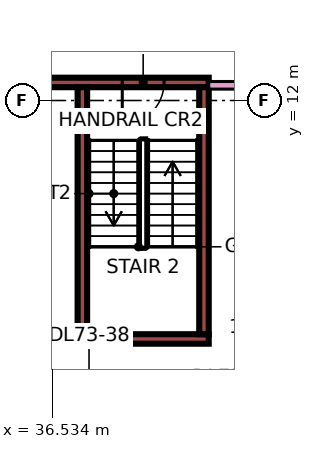
"""IFC4 building model, lengths in metres.
Left out: names, types, materials, properties, quantities, classifications, styles, units other than length and angle.
Written with IfcOpenShell. Run it as: python <this file> out.ifc"""

import sys

from ifc_helpers import new_model, si_unit, direction, frame, frame_2d, origin, place, context, subcontext, project, spatial, rectangle, extrude, element, fill, save


model = new_model("IFC4")
c1 = context("Model", 3, precision=1e-05, world=origin(), true_north=direction((0.0, 1.0)))
c2 = subcontext(c1, "Body", "Model", "MODEL_VIEW")
j1 = project(units=[si_unit("LENGTHUNIT", "METRE"), si_unit("PLANEANGLEUNIT", "RADIAN")], contexts=[c1])
p1 = place(None, origin())
s1 = spatial("IfcSite", under=j1, at=p1, CompositionType="ELEMENT")
p2 = place(p1, origin())
s2 = spatial("IfcBuilding", under=s1, at=p2, CompositionType="ELEMENT")
p3 = place(p2, frame((0.0, 0.0, 310.9)))
s3 = spatial("IfcBuildingStorey", under=s2, at=p3, CompositionType="ELEMENT", Elevation=310.9)
p4 = place(p3, frame((37.2, 5.725, 0.0), z_axis=(0.0, 0.0, 1.0), x_axis=(1.0, 0.0, 0.0)))
e1 = element("IfcWall", 1, at=p4, inside=s3, PredefinedType="SHEAR", context=c2, shape_type="SweptSolid", body=[
    extrude(rectangle(XDim=3.45, YDim=0.25, at=frame_2d((1.725, 0.0))), origin(), (0.0, 0.0, 1.0), 3.75),
])
p5 = place(p3, frame((36.4, 12.475, 0.0), z_axis=(0.0, 0.0, 1.0), x_axis=(1.0, 0.0, 0.0)))
e2 = element("IfcWall", 2, at=p5, inside=s3, PredefinedType="SHEAR", context=c2, shape_type="SweptSolid", body=[
    extrude(rectangle(XDim=4.25, YDim=0.25, at=frame_2d((2.125, 0.0))), origin(), (0.0, 0.0, 1.0), 3.75),
])
p6 = place(p5, frame((1.975, 0.0, 0.0)))
e3 = element("IfcOpeningElement", 3, at=p6, cuts=e2, PredefinedType="OPENING", context=c2, shape_type="SweptSolid", body=[
    extrude(rectangle(XDim=1.1, YDim=2.2, at=frame_2d((0.55, 1.1))), frame((0.0, 0.135, 0.0), z_axis=(0.0, -1.0, 0.0), x_axis=(1.0, 0.0, 0.0)), (0.0, 0.0, 1.0), 0.27),
])
for number, where, z_axis, x_axis in (
    (4, (37.325, 5.85, 0.0), (0.0, 0.0, 1.0), (0.0, 1.0, 0.0)),
    (5, (40.525, 5.85, 0.0), (0.0, 0.0, 1.0), (0.0, 1.0, 0.0)),
):
    element("IfcWall", number, at=place(p3, frame(where, z_axis=z_axis, x_axis=x_axis)), inside=s3, PredefinedType="SHEAR", context=c2, shape_type="SweptSolid", body=[
        extrude(rectangle(XDim=6.5, YDim=0.25, at=frame_2d((3.25, 0.0))), origin(), (0.0, 0.0, 1.0), 3.75),
    ])
p7 = place(p3, frame((40.65, 12.4, 0.0), z_axis=(0.0, 0.0, 1.0), x_axis=(1.0, 0.0, 0.0)))
e6 = element("IfcWall", 6, at=p7, inside=s3, PredefinedType="PARTITIONING", context=c2, shape_type="SweptSolid", body=[
    extrude(rectangle(XDim=22.276, YDim=0.2, at=frame_2d((11.138, 0.0))), origin(), (0.0, 0.0, 1.0), 3.35),
])
p8 = place(p7, frame((20.4, 0.0, 0.0)))
e7 = element("IfcOpeningElement", 7, at=p8, cuts=e6, PredefinedType="OPENING", context=c2, shape_type="SweptSolid", body=[
    extrude(rectangle(XDim=1.0, YDim=2.1, at=frame_2d((0.5, 1.05))), frame((0.0, 0.11, 0.0), z_axis=(0.0, -1.0, 0.0), x_axis=(1.0, 0.0, 0.0)), (0.0, 0.0, 1.0), 0.22),
])
p9 = place(p7, frame((1.05, 0.0, 0.0)))
e8 = element("IfcOpeningElement", 8, at=p9, cuts=e6, PredefinedType="OPENING", context=c2, shape_type="SweptSolid", body=[
    extrude(rectangle(XDim=1.0, YDim=2.1, at=frame_2d((0.5, 1.05))), frame((0.0, 0.11, 0.0), z_axis=(0.0, -1.0, 0.0), x_axis=(1.0, 0.0, 0.0)), (0.0, 0.0, 1.0), 0.22),
])
p10 = place(p6, frame((1.1, 0.0, 0.0), z_axis=(0.0, 0.0, 1.0), x_axis=(-1.0, 0.0, 0.0)))
e9 = element("IfcDoor", 9, at=p10, inside=s3, OperationType="SINGLE_SWING_LEFT", PredefinedType="DOOR", context=c2, shape_type="SweptSolid", body=[
    extrude(rectangle(XDim=1.1, YDim=2.2, at=frame_2d((0.55, 1.1))), frame((0.0, 0.025, 0.0), z_axis=(0.0, -1.0, 0.0), x_axis=(1.0, 0.0, 0.0)), (0.0, 0.0, 1.0), 0.05),
])
fill(e3, e9)
save(model, sys.argv[1])
